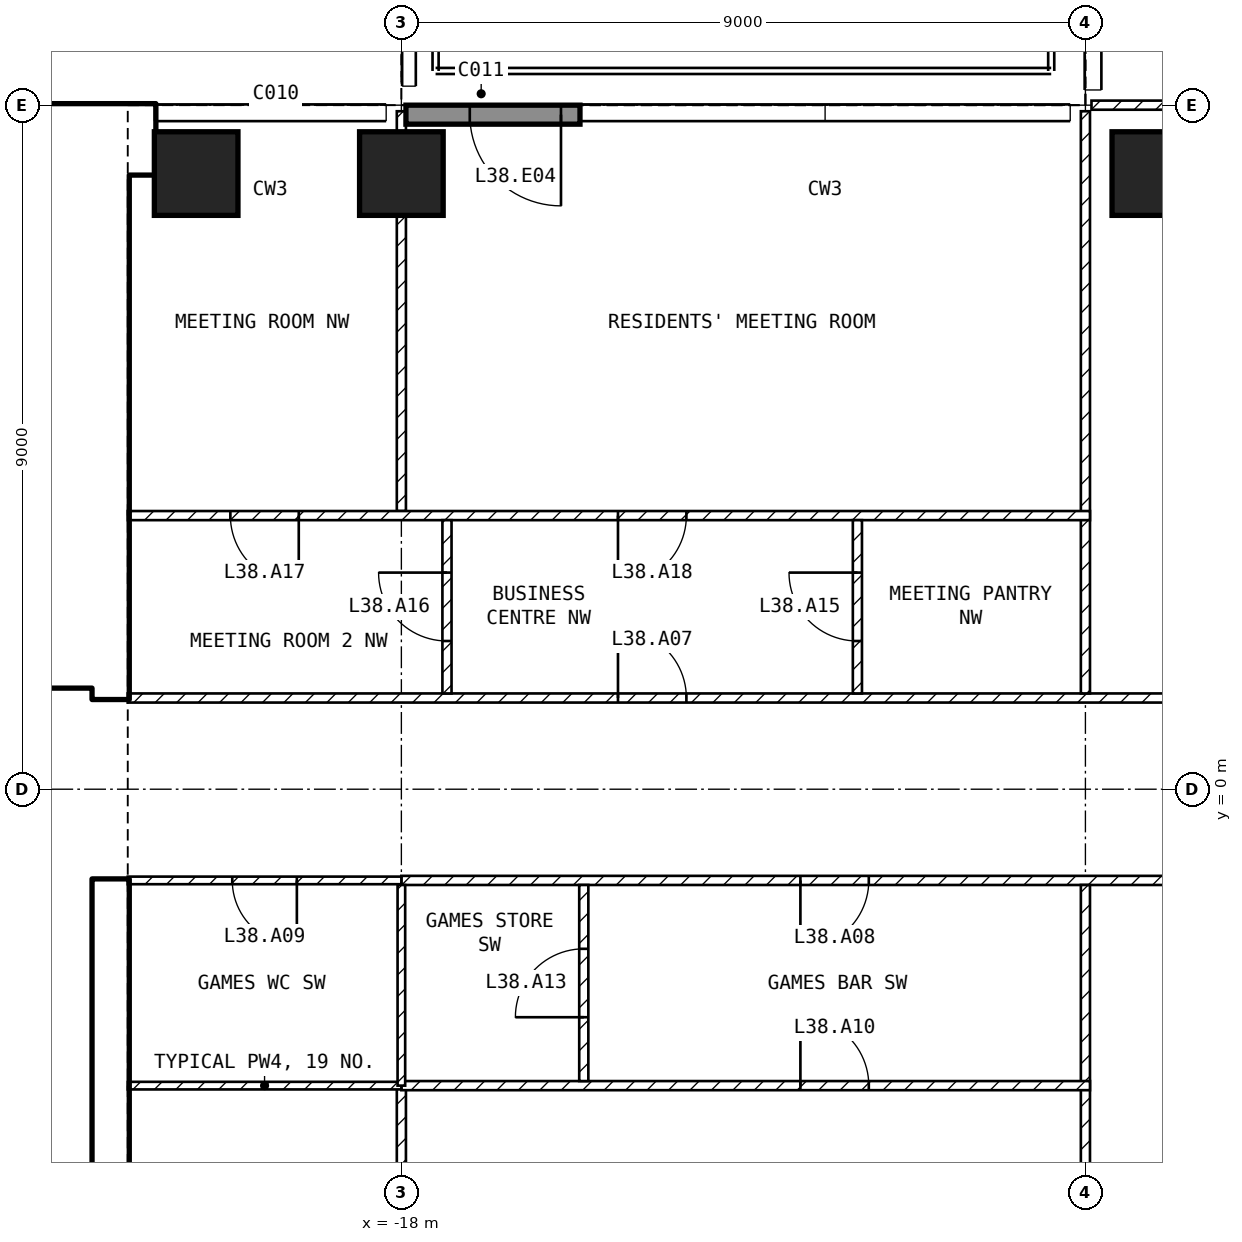
"""IFC4 building model, lengths in metres.
Left out: names, types, materials, properties, quantities, classifications, styles, units other than length and angle.
Written with IfcOpenShell. Run it as: python <this file> out.ifc"""

import sys

from ifc_helpers import new_model, si_unit, direction, frame, frame_2d, origin, origin_2d, place, context, subcontext, project, spatial, rectangle, extrude, element, fill, save


model = new_model("IFC4")
c1 = context("Model", 3, precision=1e-05, world=origin(), true_north=direction((0.0, 1.0)))
c2 = subcontext(c1, "Body", "Model", "MODEL_VIEW")
j1 = project(units=[si_unit("LENGTHUNIT", "METRE"), si_unit("PLANEANGLEUNIT", "RADIAN")], contexts=[c1])
p1 = place(None, origin())
s1 = spatial("IfcSite", under=j1, at=p1, CompositionType="ELEMENT")
p2 = place(p1, origin())
s2 = spatial("IfcBuilding", under=s1, at=p2, CompositionType="ELEMENT")
p3 = place(p2, frame((0.0, 0.0, 154.9)))
s3 = spatial("IfcBuildingStorey", under=s2, at=p3, CompositionType="ELEMENT", Elevation=154.9)
for number, where, z_axis, x_axis in (
    (1, (-20.7, 8.1, -0.3), (0.0, 0.0, 1.0), (1.0, 0.0, 0.0)),
    (2, (-18.0, 8.1, -0.3), (0.0, 0.0, 1.0), (1.0, 0.0, 0.0)),
    (3, (-8.1, 8.1, -0.3), (0.0, 0.0, 1.0), (1.0, 0.0, 0.0)),
):
    element("IfcColumn", number, at=place(p3, frame(where, z_axis=z_axis, x_axis=x_axis)), inside=s3, PredefinedType="COLUMN", context=c2, shape_type="SweptSolid", body=[
        extrude(rectangle(XDim=1.1, YDim=1.1, at=origin_2d()), origin(), (0.0, 0.0, 1.0), 7.05),
    ])
p4 = place(p3, frame((-15.65, 8.875, 0.0), z_axis=(0.0, 0.0, 1.0), x_axis=(-1.0, 0.0, 0.0)))
e4 = element("IfcWall", 4, at=p4, inside=s3, PredefinedType="SOLIDWALL", context=c2, shape_type="SweptSolid", body=[
    extrude(rectangle(XDim=2.29, YDim=0.25, at=frame_2d((1.145, 0.0))), origin(), (0.0, 0.0, 1.0), 6.75),
])
p5 = place(p4, frame((0.25, 0.0, 0.0)))
e5 = element("IfcOpeningElement", 5, at=p5, cuts=e4, PredefinedType="OPENING", context=c2, shape_type="SweptSolid", body=[
    extrude(rectangle(XDim=1.2, YDim=2.4, at=frame_2d((0.6, 1.2))), frame((0.0, 0.135, 0.0), z_axis=(0.0, -1.0, 0.0), x_axis=(1.0, 0.0, 0.0)), (0.0, 0.0, 1.0), 0.27),
])
p6 = place(p3, frame((-29.45, 8.55, 0.0), z_axis=(0.0, 0.0, 1.0), x_axis=(1.0, 0.0, 0.0)))
e6 = element("IfcWall", 6, at=p6, inside=s3, PredefinedType="SHEAR", context=c2, shape_type="SweptSolid", body=[
    extrude(rectangle(XDim=8.2, YDim=0.9, at=frame_2d((4.1, 0.0))), origin(), (0.0, 0.0, 1.0), 6.75),
])
for number, where, z_axis, x_axis in (
    (7, (-21.825, -8.1, 0.0), (0.0, 0.0, 1.0), (0.0, 1.0, 0.0)),
    (8, (-21.825, 1.2, 0.0), (0.0, 0.0, 1.0), (0.0, 1.0, 0.0)),
):
    element("IfcWall", number, at=place(p3, frame(where, z_axis=z_axis, x_axis=x_axis)), inside=s3, PredefinedType="SHEAR", context=c2, shape_type="SweptSolid", body=[
        extrude(rectangle(XDim=6.9, YDim=0.45, at=frame_2d((3.45, 0.0))), origin(), (0.0, 0.0, 1.0), 6.75),
    ])
p7 = place(p3, frame((-33.05, 1.45, 0.0), z_axis=(0.0, 0.0, 1.0), x_axis=(1.0, 0.0, 0.0)))
e9 = element("IfcWall", 9, at=p7, inside=s3, PredefinedType="SOLIDWALL", context=c2, shape_type="SweptSolid", body=[
    extrude(rectangle(XDim=11.0, YDim=0.2, at=frame_2d((5.5, 0.0))), origin(), (0.0, 0.0, 1.0), 6.75),
])
p8 = place(p7, frame((9.25, 0.0, 0.0)))
e10 = element("IfcOpeningElement", 10, at=p8, cuts=e9, PredefinedType="OPENING", context=c2, shape_type="SweptSolid", body=[
    extrude(rectangle(XDim=1.0, YDim=2.1, at=frame_2d((0.5, 1.05))), frame((0.0, 0.11, 0.0), z_axis=(0.0, -1.0, 0.0), x_axis=(1.0, 0.0, 0.0)), (0.0, 0.0, 1.0), 0.22),
])
p9 = place(p7, frame((6.75, 0.0, 0.0)))
e11 = element("IfcOpeningElement", 11, at=p9, cuts=e9, PredefinedType="OPENING", context=c2, shape_type="SweptSolid", body=[
    extrude(rectangle(XDim=1.0, YDim=2.1, at=frame_2d((0.5, 1.05))), frame((0.0, 0.11, 0.0), z_axis=(0.0, -1.0, 0.0), x_axis=(1.0, 0.0, 0.0)), (0.0, 0.0, 1.0), 0.22),
])
p10 = place(p7, frame((1.025, 0.0, 0.0)))
e12 = element("IfcOpeningElement", 12, at=p10, cuts=e9, PredefinedType="OPENING", context=c2, shape_type="SweptSolid", body=[
    extrude(rectangle(XDim=0.9, YDim=2.1, at=frame_2d((0.45, 1.05))), frame((0.0, 0.11, 0.0), z_axis=(0.0, -1.0, 0.0), x_axis=(1.0, 0.0, 0.0)), (0.0, 0.0, 1.0), 0.22),
])
p11 = place(p3, frame((-28.35, 5.15, 0.0), z_axis=(0.0, 0.0, 1.0), x_axis=(1.0, 0.0, 0.0)))
e13 = element("IfcWall", 13, at=p11, inside=s3, PredefinedType="SOLIDWALL", context=c2, shape_type="SweptSolid", body=[
    extrude(rectangle(XDim=6.3, YDim=0.2, at=frame_2d((3.15, 0.0))), origin(), (0.0, 0.0, 1.0), 6.75),
])
p12 = place(p11, frame((5.1, 0.0, 0.0)))
e14 = element("IfcOpeningElement", 14, at=p12, cuts=e13, PredefinedType="OPENING", context=c2, shape_type="SweptSolid", body=[
    extrude(rectangle(XDim=1.0, YDim=2.1, at=frame_2d((0.5, 1.05))), frame((0.0, 0.11, 0.0), z_axis=(0.0, -1.0, 0.0), x_axis=(1.0, 0.0, 0.0)), (0.0, 0.0, 1.0), 0.22),
])
p13 = place(p3, frame((-21.6, 1.2, 0.0), z_axis=(0.0, 0.0, 1.0), x_axis=(1.0, 0.0, 0.0)))
e15 = element("IfcWall", 15, at=p13, inside=s3, PredefinedType="PARTITIONING", context=c2, shape_type="SweptSolid", body=[
    extrude(rectangle(XDim=34.2, YDim=0.12, at=frame_2d((17.1, 0.0))), origin(), (0.0, 0.0, 1.0), 6.75),
])
p14 = place(p13, frame((20.7, 0.0, 0.0)))
e16 = element("IfcOpeningElement", 16, at=p14, cuts=e15, PredefinedType="OPENING", context=c2, shape_type="SweptSolid", body=[
    extrude(rectangle(XDim=1.8, YDim=2.1, at=frame_2d((0.9, 1.05))), frame((0.0, 0.07, 0.0), z_axis=(0.0, -1.0, 0.0), x_axis=(1.0, 0.0, 0.0)), (0.0, 0.0, 1.0), 0.14),
])
p15 = place(p13, frame((6.45, 0.0, 0.0)))
e17 = element("IfcOpeningElement", 17, at=p15, cuts=e15, PredefinedType="OPENING", context=c2, shape_type="SweptSolid", body=[
    extrude(rectangle(XDim=0.9, YDim=2.1, at=frame_2d((0.45, 1.05))), frame((0.0, 0.07, 0.0), z_axis=(0.0, -1.0, 0.0), x_axis=(1.0, 0.0, 0.0)), (0.0, 0.0, 1.0), 0.14),
])
p16 = place(p3, frame((18.3, -1.2, 0.0), z_axis=(0.0, 0.0, 1.0), x_axis=(-1.0, 0.0, 0.0)))
e18 = element("IfcWall", 18, at=p16, inside=s3, PredefinedType="PARTITIONING", context=c2, shape_type="SweptSolid", body=[
    extrude(rectangle(XDim=36.3, YDim=0.12, at=frame_2d((18.15, 0.0))), origin(), (0.0, 0.0, 1.0), 6.75),
])
p17 = place(p16, frame((17.4, 0.0, 0.0)))
e19 = element("IfcOpeningElement", 19, at=p17, cuts=e18, PredefinedType="OPENING", context=c2, shape_type="SweptSolid", body=[
    extrude(rectangle(XDim=1.8, YDim=2.1, at=frame_2d((0.9, 1.05))), frame((0.0, 0.07, 0.0), z_axis=(0.0, -1.0, 0.0), x_axis=(1.0, 0.0, 0.0)), (0.0, 0.0, 1.0), 0.14),
])
p18 = place(p16, frame((6.9, 0.0, 0.0)))
e20 = element("IfcOpeningElement", 20, at=p18, cuts=e18, PredefinedType="OPENING", context=c2, shape_type="SweptSolid", body=[
    extrude(rectangle(XDim=0.9, YDim=2.1, at=frame_2d((0.45, 1.05))), frame((0.0, 0.07, 0.0), z_axis=(0.0, -1.0, 0.0), x_axis=(1.0, 0.0, 0.0)), (0.0, 0.0, 1.0), 0.14),
])
p19 = place(p16, frame((30.15, 0.0, 0.0)))
e21 = element("IfcOpeningElement", 21, at=p19, cuts=e18, PredefinedType="OPENING", context=c2, shape_type="SweptSolid", body=[
    extrude(rectangle(XDim=0.9, YDim=2.1, at=frame_2d((0.45, 1.05))), frame((0.0, 0.07, 0.0), z_axis=(0.0, -1.0, 0.0), x_axis=(1.0, 0.0, 0.0)), (0.0, 0.0, 1.0), 0.14),
])
p20 = place(p3, frame((-18.0, -1.2, 0.0), z_axis=(0.0, 0.0, 1.0), x_axis=(-1.0, 0.0, 0.0)))
e22 = element("IfcWall", 22, at=p20, inside=s3, PredefinedType="PARTITIONING", context=c2, shape_type="SweptSolid", body=[
    extrude(rectangle(XDim=3.6, YDim=0.1, at=frame_2d((1.8, 0.0))), origin(), (0.0, 0.0, 1.0), 6.75),
])
p21 = place(p20, frame((1.375, 0.0, 0.0)))
e23 = element("IfcOpeningElement", 23, at=p21, cuts=e22, PredefinedType="OPENING", context=c2, shape_type="SweptSolid", body=[
    extrude(rectangle(XDim=0.85, YDim=2.1, at=frame_2d((0.425, 1.05))), frame((0.0, 0.06, 0.0), z_axis=(0.0, -1.0, 0.0), x_axis=(1.0, 0.0, 0.0)), (0.0, 0.0, 1.0), 0.12),
])
p22 = place(p3, frame((-9.0, 1.26, 0.0), z_axis=(0.0, 0.0, 1.0), x_axis=(0.0, 1.0, 0.0)))
e24 = element("IfcWall", 24, at=p22, inside=s3, PredefinedType="PARTITIONING", context=c2, shape_type="SweptSolid", body=[
    extrude(rectangle(XDim=7.66, YDim=0.12, at=frame_2d((3.83, 0.0))), origin(), (0.0, 0.0, 1.0), 6.75),
])
p23 = place(p3, frame((-8.92, 9.0, 0.0), z_axis=(0.0, 0.0, 1.0), x_axis=(1.0, 0.0, 0.0)))
e25 = element("IfcWall", 25, at=p23, inside=s3, PredefinedType="PARTITIONING", context=c2, shape_type="SweptSolid", body=[
    extrude(rectangle(XDim=4.42, YDim=0.12, at=frame_2d((2.21, 0.0))), origin(), (0.0, 0.0, 1.0), 6.75),
])
p24 = place(p3, frame((-9.0, -8.92, 0.0), z_axis=(0.0, 0.0, 1.0), x_axis=(0.0, 1.0, 0.0)))
e26 = element("IfcWall", 26, at=p24, inside=s3, PredefinedType="PARTITIONING", context=c2, shape_type="SweptSolid", body=[
    extrude(rectangle(XDim=7.66, YDim=0.12, at=frame_2d((3.83, 0.0))), origin(), (0.0, 0.0, 1.0), 6.75),
])
p25 = place(p3, frame((-18.0, 3.66, 0.0), z_axis=(0.0, 0.0, 1.0), x_axis=(0.0, 1.0, 0.0)))
e27 = element("IfcWall", 27, at=p25, inside=s3, PredefinedType="PARTITIONING", context=c2, shape_type="SweptSolid", body=[
    extrude(rectangle(XDim=5.26, YDim=0.12, at=frame_2d((2.63, 0.0))), origin(), (0.0, 0.0, 1.0), 5.914),
])
p26 = place(p3, frame((-8.94, 3.6, 0.0), z_axis=(0.0, 0.0, 1.0), x_axis=(-1.0, 0.0, 0.0)))
e28 = element("IfcWall", 28, at=p26, inside=s3, PredefinedType="PARTITIONING", context=c2, shape_type="SweptSolid", body=[
    extrude(rectangle(XDim=12.66, YDim=0.12, at=frame_2d((6.33, 0.0))), origin(), (0.0, 0.0, 1.0), 6.75),
])
p27 = place(p26, frame((10.41, 0.0, 0.0)))
e29 = element("IfcOpeningElement", 29, at=p27, cuts=e28, PredefinedType="OPENING", context=c2, shape_type="SweptSolid", body=[
    extrude(rectangle(XDim=0.9, YDim=2.1, at=frame_2d((0.45, 1.05))), frame((0.0, 0.07, 0.0), z_axis=(0.0, -1.0, 0.0), x_axis=(1.0, 0.0, 0.0)), (0.0, 0.0, 1.0), 0.14),
])
p28 = place(p26, frame((5.31, 0.0, 0.0)))
e30 = element("IfcOpeningElement", 30, at=p28, cuts=e28, PredefinedType="OPENING", context=c2, shape_type="SweptSolid", body=[
    extrude(rectangle(XDim=0.9, YDim=2.1, at=frame_2d((0.45, 1.05))), frame((0.0, 0.07, 0.0), z_axis=(0.0, -1.0, 0.0), x_axis=(1.0, 0.0, 0.0)), (0.0, 0.0, 1.0), 0.14),
])
p29 = place(p3, frame((-12.0, 1.26, 0.0), z_axis=(0.0, 0.0, 1.0), x_axis=(0.0, 1.0, 0.0)))
e31 = element("IfcWall", 31, at=p29, inside=s3, PredefinedType="PARTITIONING", context=c2, shape_type="SweptSolid", body=[
    extrude(rectangle(XDim=2.28, YDim=0.12, at=frame_2d((1.14, 0.0))), origin(), (0.0, 0.0, 1.0), 6.75),
])
p30 = place(p29, frame((0.69, 0.0, 0.0)))
e32 = element("IfcOpeningElement", 32, at=p30, cuts=e31, PredefinedType="OPENING", context=c2, shape_type="SweptSolid", body=[
    extrude(rectangle(XDim=0.9, YDim=2.1, at=frame_2d((0.45, 1.05))), frame((0.0, 0.07, 0.0), z_axis=(0.0, -1.0, 0.0), x_axis=(1.0, 0.0, 0.0)), (0.0, 0.0, 1.0), 0.14),
])
p31 = place(p3, frame((-17.4, 1.26, 0.0), z_axis=(0.0, 0.0, 1.0), x_axis=(0.0, 1.0, 0.0)))
e33 = element("IfcWall", 33, at=p31, inside=s3, PredefinedType="PARTITIONING", context=c2, shape_type="SweptSolid", body=[
    extrude(rectangle(XDim=2.28, YDim=0.12, at=frame_2d((1.14, 0.0))), origin(), (0.0, 0.0, 1.0), 6.75),
])
p32 = place(p31, frame((0.69, 0.0, 0.0)))
e34 = element("IfcOpeningElement", 34, at=p32, cuts=e33, PredefinedType="OPENING", context=c2, shape_type="SweptSolid", body=[
    extrude(rectangle(XDim=0.9, YDim=2.1, at=frame_2d((0.45, 1.05))), frame((0.0, 0.07, 0.0), z_axis=(0.0, -1.0, 0.0), x_axis=(1.0, 0.0, 0.0)), (0.0, 0.0, 1.0), 0.14),
])
p33 = place(p3, frame((-18.0, -8.92, 0.0), z_axis=(0.0, 0.0, 1.0), x_axis=(0.0, 1.0, 0.0)))
e35 = element("IfcWall", 35, at=p33, inside=s3, PredefinedType="PARTITIONING", context=c2, shape_type="SweptSolid", body=[
    extrude(rectangle(XDim=5.02, YDim=0.12, at=frame_2d((2.51, 0.0))), origin(), (0.0, 0.0, 1.0), 5.914),
])
p34 = place(p33, frame((2.62, 0.0, 0.0)))
e36 = element("IfcOpeningElement", 36, at=p34, cuts=e35, PredefinedType="OPENING", context=c2, shape_type="SweptSolid", body=[
    extrude(rectangle(XDim=0.9, YDim=2.1, at=frame_2d((0.45, 1.05))), frame((0.0, 0.07, 0.0), z_axis=(0.0, -1.0, 0.0), x_axis=(1.0, 0.0, 0.0)), (0.0, 0.0, 1.0), 0.14),
])
p35 = place(p3, frame((-18.0, -3.9, 0.0), z_axis=(0.0, 0.0, 1.0), x_axis=(1.0, 0.0, 0.0)))
e37 = element("IfcWall", 37, at=p35, inside=s3, PredefinedType="PARTITIONING", context=c2, shape_type="SweptSolid", body=[
    extrude(rectangle(XDim=9.06, YDim=0.12, at=frame_2d((4.53, 0.0))), origin(), (0.0, 0.0, 1.0), 6.75),
])
p36 = place(p35, frame((5.25, 0.0, 0.0)))
e38 = element("IfcOpeningElement", 38, at=p36, cuts=e37, PredefinedType="OPENING", context=c2, shape_type="SweptSolid", body=[
    extrude(rectangle(XDim=0.9, YDim=2.1, at=frame_2d((0.45, 1.05))), frame((0.0, 0.07, 0.0), z_axis=(0.0, -1.0, 0.0), x_axis=(1.0, 0.0, 0.0)), (0.0, 0.0, 1.0), 0.14),
])
p37 = place(p3, frame((-21.6, -3.9, 0.0), z_axis=(0.0, 0.0, 1.0), x_axis=(1.0, 0.0, 0.0)))
e39 = element("IfcWall", 39, at=p37, inside=s3, PredefinedType="PARTITIONING", context=c2, shape_type="SweptSolid", body=[
    extrude(rectangle(XDim=3.6, YDim=0.1, at=frame_2d((1.8, 0.0))), origin(), (0.0, 0.0, 1.0), 6.75),
])
p38 = place(p3, frame((-15.6, -3.84, 0.0), z_axis=(0.0, 0.0, 1.0), x_axis=(0.0, 1.0, 0.0)))
e40 = element("IfcWall", 40, at=p38, inside=s3, PredefinedType="PARTITIONING", context=c2, shape_type="SweptSolid", body=[
    extrude(rectangle(XDim=2.58, YDim=0.12, at=frame_2d((1.29, 0.0))), origin(), (0.0, 0.0, 1.0), 6.75),
])
p39 = place(p38, frame((0.84, 0.0, 0.0)))
e41 = element("IfcOpeningElement", 41, at=p39, cuts=e40, PredefinedType="OPENING", context=c2, shape_type="SweptSolid", body=[
    extrude(rectangle(XDim=0.9, YDim=2.1, at=frame_2d((0.45, 1.05))), frame((0.0, 0.07, 0.0), z_axis=(0.0, -1.0, 0.0), x_axis=(1.0, 0.0, 0.0)), (0.0, 0.0, 1.0), 0.14),
])
p40 = place(p3, frame((-18.0, -3.9, 0.0), z_axis=(0.0, 0.0, 1.0), x_axis=(0.0, 1.0, 0.0)))
e42 = element("IfcWall", 42, at=p40, inside=s3, PredefinedType="PARTITIONING", context=c2, shape_type="SweptSolid", body=[
    extrude(rectangle(XDim=2.64, YDim=0.1, at=frame_2d((1.32, 0.0))), origin(), (0.0, 0.0, 1.0), 5.914),
])
p41 = place(p5, origin())
e43 = element("IfcDoor", 43, at=p41, inside=s3, OperationType="SINGLE_SWING_LEFT", PredefinedType="DOOR", context=c2, shape_type="SweptSolid", body=[
    extrude(rectangle(XDim=1.2, YDim=2.4, at=frame_2d((0.6, 1.2))), frame((0.0, 0.025, 0.0), z_axis=(0.0, -1.0, 0.0), x_axis=(1.0, 0.0, 0.0)), (0.0, 0.0, 1.0), 0.05),
])
fill(e5, e43)
p42 = place(p12, origin())
e44 = element("IfcDoor", 44, at=p42, inside=s3, OperationType="SINGLE_SWING_LEFT", PredefinedType="DOOR", context=c2, shape_type="SweptSolid", body=[
    extrude(rectangle(XDim=1.0, YDim=2.1, at=frame_2d((0.5, 1.05))), frame((0.0, 0.025, 0.0), z_axis=(0.0, -1.0, 0.0), x_axis=(1.0, 0.0, 0.0)), (0.0, 0.0, 1.0), 0.05),
])
fill(e14, e44)
p43 = place(p15, origin())
e45 = element("IfcDoor", 45, at=p43, inside=s3, OperationType="SINGLE_SWING_LEFT", PredefinedType="DOOR", context=c2, shape_type="SweptSolid", body=[
    extrude(rectangle(XDim=0.9, YDim=2.1, at=frame_2d((0.45, 1.05))), frame((0.0, 0.025, 0.0), z_axis=(0.0, -1.0, 0.0), x_axis=(1.0, 0.0, 0.0)), (0.0, 0.0, 1.0), 0.05),
])
fill(e17, e45)
p44 = place(p19, origin())
e46 = element("IfcDoor", 46, at=p44, inside=s3, OperationType="SINGLE_SWING_RIGHT", PredefinedType="DOOR", context=c2, shape_type="SweptSolid", body=[
    extrude(rectangle(XDim=0.9, YDim=2.1, at=frame_2d((0.45, 1.05))), frame((0.0, 0.025, 0.0), z_axis=(0.0, -1.0, 0.0), x_axis=(1.0, 0.0, 0.0)), (0.0, 0.0, 1.0), 0.05),
])
fill(e21, e46)
p45 = place(p21, origin())
e47 = element("IfcDoor", 47, at=p45, inside=s3, OperationType="SINGLE_SWING_LEFT", PredefinedType="DOOR", context=c2, shape_type="SweptSolid", body=[
    extrude(rectangle(XDim=0.85, YDim=2.1, at=frame_2d((0.425, 1.05))), frame((0.0, 0.025, 0.0), z_axis=(0.0, -1.0, 0.0), x_axis=(1.0, 0.0, 0.0)), (0.0, 0.0, 1.0), 0.05),
])
fill(e23, e47)
p46 = place(p36, origin())
e48 = element("IfcDoor", 48, at=p46, inside=s3, OperationType="SINGLE_SWING_LEFT", PredefinedType="DOOR", context=c2, shape_type="SweptSolid", body=[
    extrude(rectangle(XDim=0.9, YDim=2.1, at=frame_2d((0.45, 1.05))), frame((0.0, 0.025, 0.0), z_axis=(0.0, -1.0, 0.0), x_axis=(1.0, 0.0, 0.0)), (0.0, 0.0, 1.0), 0.05),
])
fill(e38, e48)
p47 = place(p39, origin())
e49 = element("IfcDoor", 49, at=p47, inside=s3, OperationType="SINGLE_SWING_LEFT", PredefinedType="DOOR", context=c2, shape_type="SweptSolid", body=[
    extrude(rectangle(XDim=0.9, YDim=2.1, at=frame_2d((0.45, 1.05))), frame((0.0, 0.025, 0.0), z_axis=(0.0, -1.0, 0.0), x_axis=(1.0, 0.0, 0.0)), (0.0, 0.0, 1.0), 0.05),
])
fill(e41, e49)
p48 = place(p30, origin())
e50 = element("IfcDoor", 50, at=p48, inside=s3, OperationType="SINGLE_SWING_RIGHT", PredefinedType="DOOR", context=c2, shape_type="SweptSolid", body=[
    extrude(rectangle(XDim=0.9, YDim=2.1, at=frame_2d((0.45, 1.05))), frame((0.0, 0.025, 0.0), z_axis=(0.0, -1.0, 0.0), x_axis=(1.0, 0.0, 0.0)), (0.0, 0.0, 1.0), 0.05),
])
fill(e32, e50)
p49 = place(p32, origin())
e51 = element("IfcDoor", 51, at=p49, inside=s3, OperationType="SINGLE_SWING_RIGHT", PredefinedType="DOOR", context=c2, shape_type="SweptSolid", body=[
    extrude(rectangle(XDim=0.9, YDim=2.1, at=frame_2d((0.45, 1.05))), frame((0.0, 0.025, 0.0), z_axis=(0.0, -1.0, 0.0), x_axis=(1.0, 0.0, 0.0)), (0.0, 0.0, 1.0), 0.05),
])
fill(e34, e51)
p50 = place(p27, origin())
e52 = element("IfcDoor", 52, at=p50, inside=s3, OperationType="SINGLE_SWING_LEFT", PredefinedType="DOOR", context=c2, shape_type="SweptSolid", body=[
    extrude(rectangle(XDim=0.9, YDim=2.1, at=frame_2d((0.45, 1.05))), frame((0.0, 0.025, 0.0), z_axis=(0.0, -1.0, 0.0), x_axis=(1.0, 0.0, 0.0)), (0.0, 0.0, 1.0), 0.05),
])
fill(e29, e52)
p51 = place(p28, origin())
e53 = element("IfcDoor", 53, at=p51, inside=s3, OperationType="SINGLE_SWING_RIGHT", PredefinedType="DOOR", context=c2, shape_type="SweptSolid", body=[
    extrude(rectangle(XDim=0.9, YDim=2.1, at=frame_2d((0.45, 1.05))), frame((0.0, 0.025, 0.0), z_axis=(0.0, -1.0, 0.0), x_axis=(1.0, 0.0, 0.0)), (0.0, 0.0, 1.0), 0.05),
])
fill(e30, e53)
save(model, sys.argv[1])
